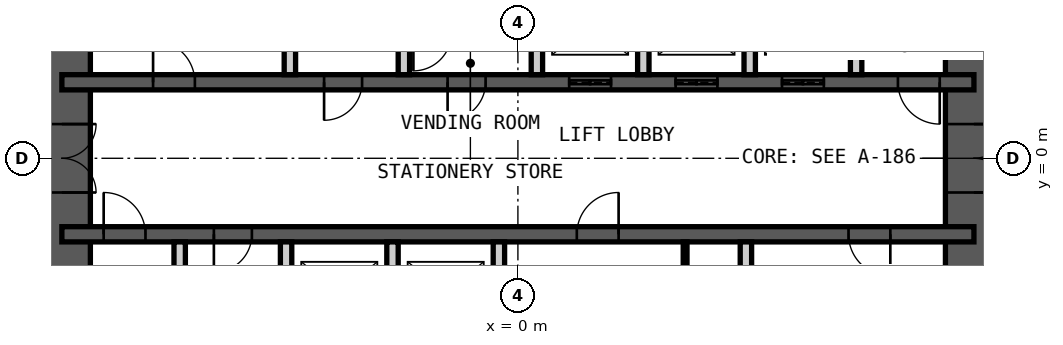
"""IFC4 building model, lengths in metres.
Left out: names, types, materials, properties, quantities, classifications, styles, units other than length and angle.
Written with IfcOpenShell. Run it as: python <this file> out.ifc"""

import sys

from ifc_helpers import new_model, si_unit, direction, frame, frame_2d, origin, place, context, subcontext, project, spatial, rectangle, extrude, element, fill, save


model = new_model("IFC4")
c1 = context("Model", 3, precision=1e-05, world=origin(), true_north=direction((0.0, 1.0)))
c2 = subcontext(c1, "Body", "Model", "MODEL_VIEW")
j1 = project(units=[si_unit("LENGTHUNIT", "METRE"), si_unit("PLANEANGLEUNIT", "RADIAN")], contexts=[c1])
p1 = place(None, origin())
s1 = spatial("IfcSite", under=j1, at=p1, CompositionType="ELEMENT")
p2 = place(p1, origin())
s2 = spatial("IfcBuilding", under=s1, at=p2, CompositionType="ELEMENT")
p3 = place(p2, frame((0.0, 0.0, 166.0)))
s3 = spatial("IfcBuildingStorey", under=s2, at=p3, CompositionType="ELEMENT", Elevation=166.0)
p4 = place(p3, frame((12.0, -9.0, 0.0), z_axis=(0.0, 0.0, 1.0), x_axis=(0.0, 1.0, 0.0)))
e1 = element("IfcWall", 1, at=p4, inside=s3, PredefinedType="SHEAR", context=c2, shape_type="SweptSolid", body=[
    extrude(rectangle(XDim=18.0, YDim=1.5, at=frame_2d((9.0, 0.0))), origin(), (0.0, 0.0, 1.0), 4.2),
])
p5 = place(p4, frame((8.1, 0.0, 0.0)))
e2 = element("IfcOpeningElement", 2, at=p5, cuts=e1, PredefinedType="OPENING", context=c2, shape_type="SweptSolid", body=[
    extrude(rectangle(XDim=1.8, YDim=2.1, at=frame_2d((0.9, 1.05))), frame((0.0, 0.76, 0.0), z_axis=(0.0, -1.0, 0.0), x_axis=(1.0, 0.0, 0.0)), (0.0, 0.0, 1.0), 1.52),
])
p6 = place(p3, frame((-12.0, -9.0, 0.0), z_axis=(0.0, 0.0, 1.0), x_axis=(0.0, 1.0, 0.0)))
e3 = element("IfcWall", 3, at=p6, inside=s3, PredefinedType="SHEAR", context=c2, shape_type="SweptSolid", body=[
    extrude(rectangle(XDim=18.0, YDim=1.5, at=frame_2d((9.0, 0.0))), origin(), (0.0, 0.0, 1.0), 4.2),
])
p7 = place(p6, frame((8.1, 0.0, 0.0)))
e4 = element("IfcOpeningElement", 4, at=p7, cuts=e3, PredefinedType="OPENING", context=c2, shape_type="SweptSolid", body=[
    extrude(rectangle(XDim=1.8, YDim=2.1, at=frame_2d((0.9, 1.05))), frame((0.0, 0.76, 0.0), z_axis=(0.0, -1.0, 0.0), x_axis=(1.0, 0.0, 0.0)), (0.0, 0.0, 1.0), 1.52),
])
p8 = place(p3, frame((-12.0, 2.0, 0.0), z_axis=(0.0, 0.0, 1.0), x_axis=(1.0, 0.0, 0.0)))
e5 = element("IfcWall", 5, at=p8, inside=s3, PredefinedType="SHEAR", context=c2, shape_type="SweptSolid", body=[
    extrude(rectangle(XDim=24.0, YDim=0.4, at=frame_2d((12.0, 0.0))), origin(), (0.0, 0.0, 1.0), 4.2),
])
p9 = place(p8, frame((2.4, 0.0, 0.0)))
e6 = element("IfcOpeningElement", 6, at=p9, cuts=e5, PredefinedType="OPENING", context=c2, shape_type="SweptSolid", body=[
    extrude(rectangle(XDim=1.1, YDim=2.1, at=frame_2d((0.55, 1.05))), frame((0.0, 0.21, 0.0), z_axis=(0.0, -1.0, 0.0), x_axis=(1.0, 0.0, 0.0)), (0.0, 0.0, 1.0), 0.42),
])
p10 = place(p8, frame((22.0, 0.0, 0.0)))
e7 = element("IfcOpeningElement", 7, at=p10, cuts=e5, PredefinedType="OPENING", context=c2, shape_type="SweptSolid", body=[
    extrude(rectangle(XDim=1.1, YDim=2.1, at=frame_2d((0.55, 1.05))), frame((0.0, 0.21, 0.0), z_axis=(0.0, -1.0, 0.0), x_axis=(1.0, 0.0, 0.0)), (0.0, 0.0, 1.0), 0.42),
])
p11 = place(p8, frame((10.15, 0.0, 0.0)))
e8 = element("IfcOpeningElement", 8, at=p11, cuts=e5, PredefinedType="OPENING", context=c2, shape_type="SweptSolid", body=[
    extrude(rectangle(XDim=1.0, YDim=2.1, at=frame_2d((0.5, 1.05))), frame((0.0, 0.21, 0.0), z_axis=(0.0, -1.0, 0.0), x_axis=(1.0, 0.0, 0.0)), (0.0, 0.0, 1.0), 0.42),
])
p12 = place(p8, frame((6.9, 0.0, 0.0)))
e9 = element("IfcOpeningElement", 9, at=p12, cuts=e5, PredefinedType="OPENING", context=c2, shape_type="SweptSolid", body=[
    extrude(rectangle(XDim=1.0, YDim=2.1, at=frame_2d((0.5, 1.05))), frame((0.0, 0.21, 0.0), z_axis=(0.0, -1.0, 0.0), x_axis=(1.0, 0.0, 0.0)), (0.0, 0.0, 1.0), 0.42),
])
p13 = place(p8, frame((13.35, 0.0, 0.0)))
e10 = element("IfcOpeningElement", 10, at=p13, cuts=e5, PredefinedType="OPENING", context=c2, shape_type="SweptSolid", body=[
    extrude(rectangle(XDim=1.1, YDim=2.4, at=frame_2d((0.55, 1.2))), frame((0.0, 0.21, 0.0), z_axis=(0.0, -1.0, 0.0), x_axis=(1.0, 0.0, 0.0)), (0.0, 0.0, 1.0), 0.42),
])
p14 = place(p8, frame((16.15, 0.0, 0.0)))
e11 = element("IfcOpeningElement", 11, at=p14, cuts=e5, PredefinedType="OPENING", context=c2, shape_type="SweptSolid", body=[
    extrude(rectangle(XDim=1.1, YDim=2.4, at=frame_2d((0.55, 1.2))), frame((0.0, 0.21, 0.0), z_axis=(0.0, -1.0, 0.0), x_axis=(1.0, 0.0, 0.0)), (0.0, 0.0, 1.0), 0.42),
])
p15 = place(p8, frame((18.95, 0.0, 0.0)))
e12 = element("IfcOpeningElement", 12, at=p15, cuts=e5, PredefinedType="OPENING", context=c2, shape_type="SweptSolid", body=[
    extrude(rectangle(XDim=1.1, YDim=2.4, at=frame_2d((0.55, 1.2))), frame((0.0, 0.21, 0.0), z_axis=(0.0, -1.0, 0.0), x_axis=(1.0, 0.0, 0.0)), (0.0, 0.0, 1.0), 0.42),
])
p16 = place(p3, frame((-12.0, -2.0, 0.0), z_axis=(0.0, 0.0, 1.0), x_axis=(1.0, 0.0, 0.0)))
e13 = element("IfcWall", 13, at=p16, inside=s3, PredefinedType="SHEAR", context=c2, shape_type="SweptSolid", body=[
    extrude(rectangle(XDim=24.0, YDim=0.4, at=frame_2d((12.0, 0.0))), origin(), (0.0, 0.0, 1.0), 4.2),
])
p17 = place(p16, frame((1.1, 0.0, 0.0)))
e14 = element("IfcOpeningElement", 14, at=p17, cuts=e13, PredefinedType="OPENING", context=c2, shape_type="SweptSolid", body=[
    extrude(rectangle(XDim=1.1, YDim=2.1, at=frame_2d((0.55, 1.05))), frame((0.0, 0.21, 0.0), z_axis=(0.0, -1.0, 0.0), x_axis=(1.0, 0.0, 0.0)), (0.0, 0.0, 1.0), 0.42),
])
p18 = place(p16, frame((13.55, 0.0, 0.0)))
e15 = element("IfcOpeningElement", 15, at=p18, cuts=e13, PredefinedType="OPENING", context=c2, shape_type="SweptSolid", body=[
    extrude(rectangle(XDim=1.1, YDim=2.1, at=frame_2d((0.55, 1.05))), frame((0.0, 0.21, 0.0), z_axis=(0.0, -1.0, 0.0), x_axis=(1.0, 0.0, 0.0)), (0.0, 0.0, 1.0), 0.42),
])
p19 = place(p16, frame((20.7, 0.0, 0.0)))
e16 = element("IfcOpeningElement", 16, at=p19, cuts=e13, PredefinedType="OPENING", context=c2, shape_type="SweptSolid", body=[
    extrude(rectangle(XDim=1.1, YDim=2.1, at=frame_2d((0.55, 1.05))), frame((0.0, 0.21, 0.0), z_axis=(0.0, -1.0, 0.0), x_axis=(1.0, 0.0, 0.0)), (0.0, 0.0, 1.0), 0.42),
])
p20 = place(p16, frame((4.0, 0.0, 0.0)))
e17 = element("IfcOpeningElement", 17, at=p20, cuts=e13, PredefinedType="OPENING", context=c2, shape_type="SweptSolid", body=[
    extrude(rectangle(XDim=1.0, YDim=2.1, at=frame_2d((0.5, 1.05))), frame((0.0, 0.21, 0.0), z_axis=(0.0, -1.0, 0.0), x_axis=(1.0, 0.0, 0.0)), (0.0, 0.0, 1.0), 0.42),
])
for number, where, z_axis, x_axis in (
    (18, (-6.0, 2.2, 0.0), (0.0, 0.0, 1.0), (0.0, 1.0, 0.0)),
    (19, (-3.0, 2.2, 0.0), (0.0, 0.0, 1.0), (0.0, 1.0, 0.0)),
    (20, (0.5, 2.2, 0.0), (0.0, 0.0, 1.0), (0.0, 1.0, 0.0)),
    (21, (3.3, 2.2, 0.0), (0.0, 0.0, 1.0), (0.0, 1.0, 0.0)),
    (22, (6.1, 2.2, 0.0), (0.0, 0.0, 1.0), (0.0, 1.0, 0.0)),
    (23, (8.9, 2.2, 0.0), (0.0, 0.0, 1.0), (0.0, 1.0, 0.0)),
    (24, (-8.9, -4.85, 0.0), (0.0, 0.0, 1.0), (0.0, 1.0, 0.0)),
    (25, (-6.1, -4.85, 0.0), (0.0, 0.0, 1.0), (0.0, 1.0, 0.0)),
    (26, (-3.3, -4.85, 0.0), (0.0, 0.0, 1.0), (0.0, 1.0, 0.0)),
    (27, (-0.5, -4.85, 0.0), (0.0, 0.0, 1.0), (0.0, 1.0, 0.0)),
    (28, (6.0, -4.85, 0.0), (0.0, 0.0, 1.0), (0.0, 1.0, 0.0)),
):
    element("IfcWall", number, at=place(p3, frame(where, z_axis=z_axis, x_axis=x_axis)), inside=s3, PredefinedType="PARTITIONING", context=c2, shape_type="SweptSolid", body=[
        extrude(rectangle(XDim=2.65, YDim=0.3, at=frame_2d((1.325, 0.0))), origin(), (0.0, 0.0, 1.0), 3.98),
    ])
p21 = place(p3, frame((4.4, -4.85, 0.0), z_axis=(0.0, 0.0, 1.0), x_axis=(0.0, 1.0, 0.0)))
e29 = element("IfcWall", 29, at=p21, inside=s3, PredefinedType="PARTITIONING", context=c2, shape_type="SweptSolid", body=[
    extrude(rectangle(XDim=2.65, YDim=0.1, at=frame_2d((1.325, 0.0))), origin(), (0.0, 0.0, 1.0), 3.98),
])
p22 = place(p21, frame((0.1, 0.0, 0.0)))
e30 = element("IfcOpeningElement", 30, at=p22, cuts=e29, PredefinedType="OPENING", context=c2, shape_type="SweptSolid", body=[
    extrude(rectangle(XDim=1.0, YDim=2.4, at=frame_2d((0.5, 1.2))), frame((0.0, 0.06, 0.0), z_axis=(0.0, -1.0, 0.0), x_axis=(1.0, 0.0, 0.0)), (0.0, 0.0, 1.0), 0.12),
])
p23 = place(p9, origin())
e31 = element("IfcDoor", 31, at=p23, inside=s3, OperationType="SINGLE_SWING_RIGHT", PredefinedType="DOOR", context=c2, shape_type="SweptSolid", body=[
    extrude(rectangle(XDim=1.1, YDim=2.1, at=frame_2d((0.55, 1.05))), frame((0.0, 0.025, 0.0), z_axis=(0.0, -1.0, 0.0), x_axis=(1.0, 0.0, 0.0)), (0.0, 0.0, 1.0), 0.05),
])
fill(e6, e31)
p24 = place(p17, origin())
e32 = element("IfcDoor", 32, at=p24, inside=s3, OperationType="SINGLE_SWING_RIGHT", PredefinedType="DOOR", context=c2, shape_type="SweptSolid", body=[
    extrude(rectangle(XDim=1.1, YDim=2.1, at=frame_2d((0.55, 1.05))), frame((0.0, 0.025, 0.0), z_axis=(0.0, -1.0, 0.0), x_axis=(1.0, 0.0, 0.0)), (0.0, 0.0, 1.0), 0.05),
])
fill(e14, e32)
p25 = place(p10, origin())
e33 = element("IfcDoor", 33, at=p25, inside=s3, OperationType="SINGLE_SWING_RIGHT", PredefinedType="DOOR", context=c2, shape_type="SweptSolid", body=[
    extrude(rectangle(XDim=1.1, YDim=2.1, at=frame_2d((0.55, 1.05))), frame((0.0, 0.025, 0.0), z_axis=(0.0, -1.0, 0.0), x_axis=(1.0, 0.0, 0.0)), (0.0, 0.0, 1.0), 0.05),
])
fill(e7, e33)
p26 = place(p11, origin())
e34 = element("IfcDoor", 34, at=p26, inside=s3, OperationType="SINGLE_SWING_LEFT", PredefinedType="DOOR", context=c2, shape_type="SweptSolid", body=[
    extrude(rectangle(XDim=1.0, YDim=2.1, at=frame_2d((0.5, 1.05))), frame((0.0, 0.025, 0.0), z_axis=(0.0, -1.0, 0.0), x_axis=(1.0, 0.0, 0.0)), (0.0, 0.0, 1.0), 0.05),
])
fill(e8, e34)
p27 = place(p18, origin())
e35 = element("IfcDoor", 35, at=p27, inside=s3, OperationType="SINGLE_SWING_LEFT", PredefinedType="DOOR", context=c2, shape_type="SweptSolid", body=[
    extrude(rectangle(XDim=1.1, YDim=2.1, at=frame_2d((0.55, 1.05))), frame((0.0, 0.025, 0.0), z_axis=(0.0, -1.0, 0.0), x_axis=(1.0, 0.0, 0.0)), (0.0, 0.0, 1.0), 0.05),
])
fill(e15, e35)
p28 = place(p19, origin())
e36 = element("IfcDoor", 36, at=p28, inside=s3, OperationType="SINGLE_SWING_RIGHT", PredefinedType="DOOR", context=c2, shape_type="SweptSolid", body=[
    extrude(rectangle(XDim=1.1, YDim=2.1, at=frame_2d((0.55, 1.05))), frame((0.0, 0.025, 0.0), z_axis=(0.0, -1.0, 0.0), x_axis=(1.0, 0.0, 0.0)), (0.0, 0.0, 1.0), 0.05),
])
fill(e16, e36)
p29 = place(p5, origin())
e37 = element("IfcDoor", 37, at=p29, inside=s3, OperationType="DOUBLE_DOOR_DOUBLE_SWING", PredefinedType="DOOR", context=c2, shape_type="SweptSolid", body=[
    extrude(rectangle(XDim=1.8, YDim=2.1, at=frame_2d((0.9, 1.05))), frame((0.0, 0.025, 0.0), z_axis=(0.0, -1.0, 0.0), x_axis=(1.0, 0.0, 0.0)), (0.0, 0.0, 1.0), 0.05),
])
fill(e2, e37)
p30 = place(p7, origin())
e38 = element("IfcDoor", 38, at=p30, inside=s3, OperationType="DOUBLE_DOOR_DOUBLE_SWING", PredefinedType="DOOR", context=c2, shape_type="SweptSolid", body=[
    extrude(rectangle(XDim=1.8, YDim=2.1, at=frame_2d((0.9, 1.05))), frame((0.0, 0.025, 0.0), z_axis=(0.0, -1.0, 0.0), x_axis=(1.0, 0.0, 0.0)), (0.0, 0.0, 1.0), 0.05),
])
fill(e4, e38)
p31 = place(p12, origin())
e39 = element("IfcDoor", 39, at=p31, inside=s3, OperationType="SINGLE_SWING_LEFT", PredefinedType="DOOR", context=c2, shape_type="SweptSolid", body=[
    extrude(rectangle(XDim=1.0, YDim=2.1, at=frame_2d((0.5, 1.05))), frame((0.0, 0.025, 0.0), z_axis=(0.0, -1.0, 0.0), x_axis=(1.0, 0.0, 0.0)), (0.0, 0.0, 1.0), 0.05),
])
fill(e9, e39)
p32 = place(p13, origin())
e40 = element("IfcDoor", 40, at=p32, inside=s3, OperationType="DOUBLE_DOOR_SLIDING", PredefinedType="DOOR", context=c2, shape_type="SweptSolid", body=[
    extrude(rectangle(XDim=1.1, YDim=2.4, at=frame_2d((0.55, 1.2))), frame((0.0, 0.025, 0.0), z_axis=(0.0, -1.0, 0.0), x_axis=(1.0, 0.0, 0.0)), (0.0, 0.0, 1.0), 0.05),
])
fill(e10, e40)
p33 = place(p14, origin())
e41 = element("IfcDoor", 41, at=p33, inside=s3, OperationType="DOUBLE_DOOR_SLIDING", PredefinedType="DOOR", context=c2, shape_type="SweptSolid", body=[
    extrude(rectangle(XDim=1.1, YDim=2.4, at=frame_2d((0.55, 1.2))), frame((0.0, 0.025, 0.0), z_axis=(0.0, -1.0, 0.0), x_axis=(1.0, 0.0, 0.0)), (0.0, 0.0, 1.0), 0.05),
])
fill(e11, e41)
p34 = place(p15, origin())
e42 = element("IfcDoor", 42, at=p34, inside=s3, OperationType="DOUBLE_DOOR_SLIDING", PredefinedType="DOOR", context=c2, shape_type="SweptSolid", body=[
    extrude(rectangle(XDim=1.1, YDim=2.4, at=frame_2d((0.55, 1.2))), frame((0.0, 0.025, 0.0), z_axis=(0.0, -1.0, 0.0), x_axis=(1.0, 0.0, 0.0)), (0.0, 0.0, 1.0), 0.05),
])
fill(e12, e42)
p35 = place(p20, origin())
e43 = element("IfcDoor", 43, at=p35, inside=s3, OperationType="SINGLE_SWING_LEFT", PredefinedType="DOOR", context=c2, shape_type="SweptSolid", body=[
    extrude(rectangle(XDim=1.0, YDim=2.1, at=frame_2d((0.5, 1.05))), frame((0.0, 0.025, 0.0), z_axis=(0.0, -1.0, 0.0), x_axis=(1.0, 0.0, 0.0)), (0.0, 0.0, 1.0), 0.05),
])
fill(e17, e43)
save(model, sys.argv[1])
